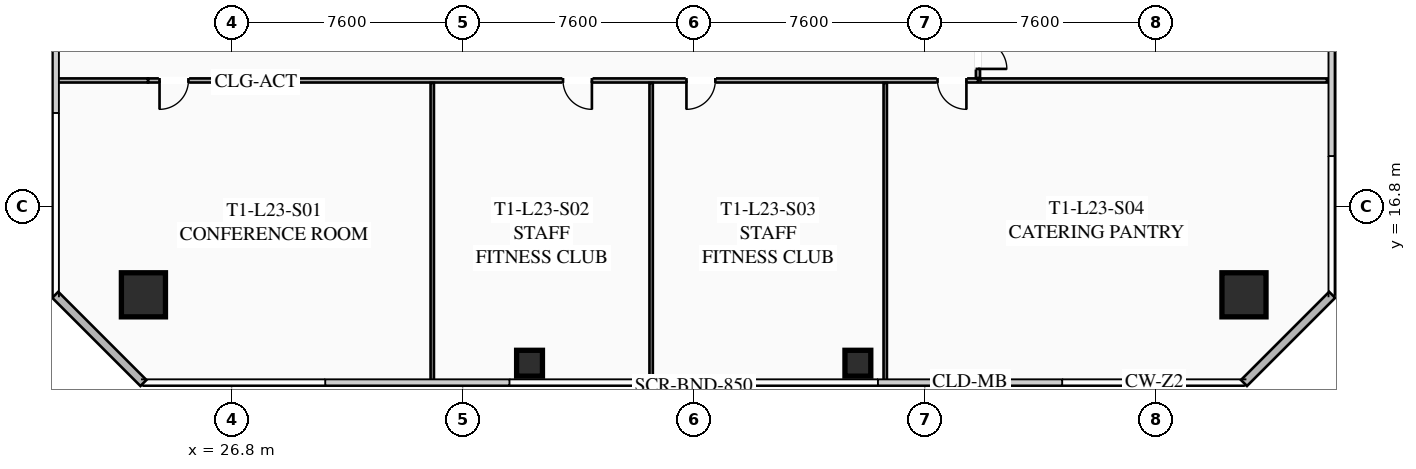
"""IFC4 building model, lengths in metres.
Left out: names, types, materials, properties, quantities, classifications, styles, units other than length and angle.
Written with IfcOpenShell. Run it as: python <this file> out.ifc"""

import sys

from ifc_helpers import new_model, si_unit, direction, frame, frame_2d, origin, origin_2d, place, context, subcontext, project, spatial, rectangle, hollow_rectangle, extrude, element, fill, save


model = new_model("IFC4")
c1 = context("Model", 3, precision=1e-05, world=origin(), true_north=direction((0.0, 1.0)))
c2 = subcontext(c1, "Body", "Model", "MODEL_VIEW")
j1 = project(units=[si_unit("LENGTHUNIT", "METRE"), si_unit("PLANEANGLEUNIT", "RADIAN")], contexts=[c1])
p1 = place(None, origin())
s1 = spatial("IfcSite", under=j1, at=p1, CompositionType="ELEMENT")
p2 = place(p1, origin())
s2 = spatial("IfcBuilding", under=s1, at=p2, CompositionType="ELEMENT")
p3 = place(p2, frame((0.0, 0.0, 88.5)))
s3 = spatial("IfcBuildingStorey", under=s2, at=p3, CompositionType="ELEMENT", Elevation=88.5)
for number, where, z_axis, x_axis in (
    (1, (23.9, 13.9, 0.0), (0.0, 0.0, 1.0), (1.0, 0.0, 0.0)),
    (2, (60.1, 13.9, 0.0), (0.0, 0.0, 1.0), (1.0, 0.0, 0.0)),
):
    element("IfcColumn", number, at=place(p3, frame(where, z_axis=z_axis, x_axis=x_axis)), inside=s3, PredefinedType="COLUMN", context=c2, shape_type="SweptSolid", body=[
        extrude(hollow_rectangle(XDim=1.45, YDim=1.45, WallThickness=0.055, at=origin_2d()), origin(), (0.0, 0.0, 1.0), 3.35),
    ])
for number, where, z_axis, x_axis in (
    (3, (36.6, 11.65, 0.0), (0.0, 0.0, 1.0), (1.0, 0.0, 0.0)),
    (4, (47.4, 11.65, 0.0), (0.0, 0.0, 1.0), (1.0, 0.0, 0.0)),
):
    element("IfcColumn", number, at=place(p3, frame(where, z_axis=z_axis, x_axis=x_axis)), inside=s3, PredefinedType="COLUMN", context=c2, shape_type="SweptSolid", body=[
        extrude(hollow_rectangle(XDim=0.85, YDim=0.85, WallThickness=0.035, at=origin_2d()), origin(), (0.0, 0.0, 1.0), 3.35),
    ])
for number, where, z_axis, x_axis in (
    (5, (23.9, 11.0, 0.0), (0.0, 0.0, 1.0), (-0.707, 0.707, 0.0)),
    (6, (63.0, 13.9, 0.0), (0.0, 0.0, 1.0), (-0.707, -0.707, 0.0)),
):
    element("IfcWall", number, at=place(p3, frame(where, z_axis=z_axis, x_axis=x_axis)), inside=s3, PredefinedType="SOLIDWALL", context=c2, shape_type="SweptSolid", body=[
        extrude(rectangle(XDim=4.101, YDim=0.28, at=frame_2d((2.051, 0.0))), origin(), (0.0, 0.0, 1.0), 3.35),
    ])
p4 = place(p3, frame((51.35, 20.95, 0.0), z_axis=(0.0, 0.0, 1.0), x_axis=(-1.0, 0.0, 0.0)))
e7 = element("IfcWall", 7, at=p4, inside=s3, PredefinedType="PARTITIONING", context=c2, shape_type="SweptSolid", body=[
    extrude(rectangle(XDim=27.3, YDim=0.135, at=frame_2d((13.65, 0.0))), origin(), (0.0, 0.0, 1.0), 2.703),
])
p5 = place(p4, frame((25.97, 0.0, 0.0)))
e8 = element("IfcOpeningElement", 8, at=p5, cuts=e7, PredefinedType="OPENING", context=c2, shape_type="SweptSolid", body=[
    extrude(rectangle(XDim=0.95, YDim=2.05, at=frame_2d((0.475, 1.025))), frame((0.0, 0.077, 0.0), z_axis=(0.0, -1.0, 0.0), x_axis=(1.0, 0.0, 0.0)), (0.0, 0.0, 1.0), 0.155),
])
p6 = place(p4, frame((12.698, 0.0, 0.0)))
e9 = element("IfcOpeningElement", 9, at=p6, cuts=e7, PredefinedType="OPENING", context=c2, shape_type="SweptSolid", body=[
    extrude(rectangle(XDim=0.95, YDim=2.05, at=frame_2d((0.475, 1.025))), frame((0.0, 0.077, 0.0), z_axis=(0.0, -1.0, 0.0), x_axis=(1.0, 0.0, 0.0)), (0.0, 0.0, 1.0), 0.155),
])
p7 = place(p4, frame((8.639, 0.0, 0.0)))
e10 = element("IfcOpeningElement", 10, at=p7, cuts=e7, PredefinedType="OPENING", context=c2, shape_type="SweptSolid", body=[
    extrude(rectangle(XDim=0.95, YDim=2.05, at=frame_2d((0.475, 1.025))), frame((0.0, 0.077, 0.0), z_axis=(0.0, -1.0, 0.0), x_axis=(1.0, 0.0, 0.0)), (0.0, 0.0, 1.0), 0.155),
])
p8 = place(p4, frame((0.38, 0.0, 0.0)))
e11 = element("IfcOpeningElement", 11, at=p8, cuts=e7, PredefinedType="OPENING", context=c2, shape_type="SweptSolid", body=[
    extrude(rectangle(XDim=0.95, YDim=2.05, at=frame_2d((0.475, 1.025))), frame((0.0, 0.077, 0.0), z_axis=(0.0, -1.0, 0.0), x_axis=(1.0, 0.0, 0.0)), (0.0, 0.0, 1.0), 0.155),
])
p9 = place(p3, frame((21.02, 20.95, 0.0), z_axis=(0.0, 0.0, 1.0), x_axis=(1.0, 0.0, 0.0)))
e12 = element("IfcWall", 12, at=p9, inside=s3, PredefinedType="PARTITIONING", context=c2, shape_type="SweptSolid", body=[
    extrude(rectangle(XDim=3.03, YDim=0.135, at=frame_2d((1.515, 0.0))), origin(), (0.0, 0.0, 1.0), 2.703),
])
for number, where, z_axis, x_axis in (
    (13, (33.4, 11.02, 0.0), (0.0, 0.0, 1.0), (0.0, 1.0, 0.0)),
    (14, (40.6, 11.02, 0.0), (0.0, 0.0, 1.0), (0.0, 1.0, 0.0)),
    (15, (48.3, 11.02, 0.0), (0.0, 0.0, 1.0), (0.0, 1.0, 0.0)),
):
    element("IfcWall", number, at=place(p3, frame(where, z_axis=z_axis, x_axis=x_axis)), inside=s3, PredefinedType="PARTITIONING", context=c2, shape_type="SweptSolid", body=[
        extrude(rectangle(XDim=9.85, YDim=0.11, at=frame_2d((4.925, 0.0))), origin(), (0.0, 0.0, 1.0), 2.703),
    ])
p10 = place(p3, frame((51.35, 42.69, 0.0), z_axis=(0.0, 0.0, 1.0), x_axis=(0.0, -1.0, 0.0)))
e16 = element("IfcWall", 16, at=p10, inside=s3, PredefinedType="PARTITIONING", context=c2, shape_type="SweptSolid", body=[
    extrude(rectangle(XDim=21.66, YDim=0.135, at=frame_2d((10.83, 0.0))), origin(), (0.0, 0.0, 1.0), 2.703),
])
p11 = place(p10, frame((20.41, 0.0, 0.0)))
e17 = element("IfcOpeningElement", 17, at=p11, cuts=e16, PredefinedType="OPENING", context=c2, shape_type="SweptSolid", body=[
    extrude(rectangle(XDim=0.95, YDim=2.05, at=frame_2d((0.475, 1.025))), frame((0.0, 0.077, 0.0), z_axis=(0.0, -1.0, 0.0), x_axis=(1.0, 0.0, 0.0)), (0.0, 0.0, 1.0), 0.155),
])
p12 = place(p3, frame((51.43, 20.95, 0.0), z_axis=(0.0, 0.0, 1.0), x_axis=(1.0, 0.0, 0.0)))
e18 = element("IfcWall", 18, at=p12, inside=s3, PredefinedType="PARTITIONING", context=c2, shape_type="SweptSolid", body=[
    extrude(rectangle(XDim=11.4, YDim=0.135, at=frame_2d((5.7, 0.0))), origin(), (0.0, 0.0, 1.0), 2.703),
])
p13 = place(p5, origin())
e19 = element("IfcDoor", 19, at=p13, inside=s3, OperationType="SINGLE_SWING_RIGHT", PredefinedType="DOOR", context=c2, shape_type="SweptSolid", body=[
    extrude(rectangle(XDim=0.95, YDim=2.05, at=frame_2d((0.475, 1.025))), frame((0.0, 0.025, 0.0), z_axis=(0.0, -1.0, 0.0), x_axis=(1.0, 0.0, 0.0)), (0.0, 0.0, 1.0), 0.05),
])
fill(e8, e19)
p14 = place(p6, origin())
e20 = element("IfcDoor", 20, at=p14, inside=s3, OperationType="SINGLE_SWING_LEFT", PredefinedType="DOOR", context=c2, shape_type="SweptSolid", body=[
    extrude(rectangle(XDim=0.95, YDim=2.05, at=frame_2d((0.475, 1.025))), frame((0.0, 0.025, 0.0), z_axis=(0.0, -1.0, 0.0), x_axis=(1.0, 0.0, 0.0)), (0.0, 0.0, 1.0), 0.05),
])
fill(e9, e20)
p15 = place(p7, origin())
e21 = element("IfcDoor", 21, at=p15, inside=s3, OperationType="SINGLE_SWING_RIGHT", PredefinedType="DOOR", context=c2, shape_type="SweptSolid", body=[
    extrude(rectangle(XDim=0.95, YDim=2.05, at=frame_2d((0.475, 1.025))), frame((0.0, 0.025, 0.0), z_axis=(0.0, -1.0, 0.0), x_axis=(1.0, 0.0, 0.0)), (0.0, 0.0, 1.0), 0.05),
])
fill(e10, e21)
p16 = place(p8, origin())
e22 = element("IfcDoor", 22, at=p16, inside=s3, OperationType="SINGLE_SWING_LEFT", PredefinedType="DOOR", context=c2, shape_type="SweptSolid", body=[
    extrude(rectangle(XDim=0.95, YDim=2.05, at=frame_2d((0.475, 1.025))), frame((0.0, 0.025, 0.0), z_axis=(0.0, -1.0, 0.0), x_axis=(1.0, 0.0, 0.0)), (0.0, 0.0, 1.0), 0.05),
])
fill(e11, e22)
p17 = place(p11, origin())
e23 = element("IfcDoor", 23, at=p17, inside=s3, OperationType="SINGLE_SWING_RIGHT", PredefinedType="DOOR", context=c2, shape_type="SweptSolid", body=[
    extrude(rectangle(XDim=0.95, YDim=2.05, at=frame_2d((0.475, 1.025))), frame((0.0, 0.025, 0.0), z_axis=(0.0, -1.0, 0.0), x_axis=(1.0, 0.0, 0.0)), (0.0, 0.0, 1.0), 0.05),
])
fill(e17, e23)
save(model, sys.argv[1])
